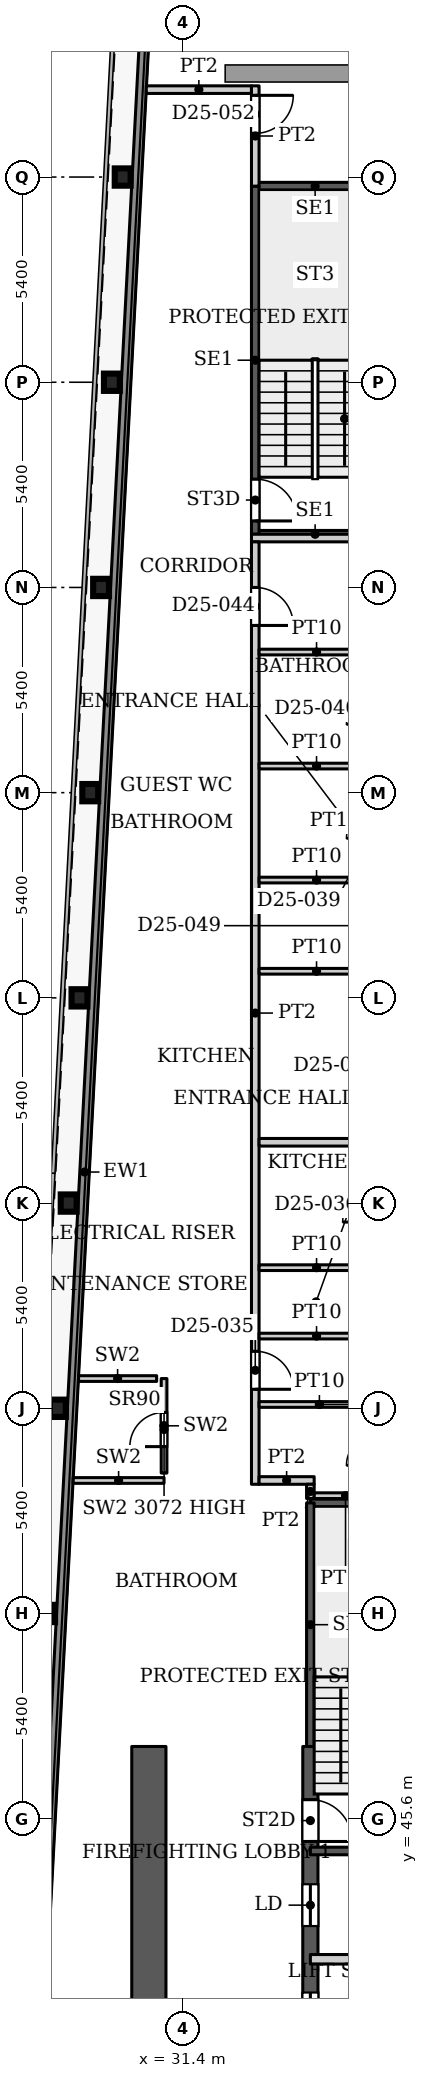
"""IFC4 building model, lengths in metres.
Left out: names, types, materials, properties, quantities, classifications, styles, units other than length and angle.
Written with IfcOpenShell. Run it as: python <this file> out.ifc"""

import sys

from ifc_helpers import new_model, si_unit, direction, frame, frame_2d, origin, origin_2d, place, context, subcontext, project, spatial, rectangle, i_section, extrude, source, transform, mapped, element, fill, save


model = new_model("IFC4")
c1 = context("Model", 3, precision=1e-05, world=origin(), true_north=direction((0.0, 1.0)))
c2 = subcontext(c1, "Body", "Model", "MODEL_VIEW")
j1 = project(units=[si_unit("LENGTHUNIT", "METRE"), si_unit("PLANEANGLEUNIT", "RADIAN")], contexts=[c1])
p1 = place(None, origin())
s1 = spatial("IfcSite", under=j1, at=p1, CompositionType="ELEMENT")
p2 = place(p1, origin())
s2 = spatial("IfcBuilding", under=s1, at=p2, CompositionType="ELEMENT")
p3 = place(p2, frame((0.0, 0.0, 113.6)))
s3 = spatial("IfcBuildingStorey", under=s2, at=p3, CompositionType="ELEMENT", Elevation=113.6)
for number, where, z_axis, x_axis in (
    (1, (27.822, 51.0, 0.0), (0.0, 0.0, 1.0), (1.0, 0.0, 0.0)),
    (2, (28.106, 56.4, 0.0), (0.0, 0.0, 1.0), (1.0, 0.0, 0.0)),
    (3, (28.39, 61.8, 0.0), (0.0, 0.0, 1.0), (1.0, 0.0, 0.0)),
    (4, (28.674, 67.2, 0.0), (0.0, 0.0, 1.0), (1.0, 0.0, 0.0)),
    (5, (28.958, 72.6, 0.0), (0.0, 0.0, 1.0), (1.0, 0.0, 0.0)),
    (6, (29.243, 78.0, 0.0), (0.0, 0.0, 1.0), (1.0, 0.0, 0.0)),
    (7, (29.527, 83.4, 0.0), (0.0, 0.0, 1.0), (1.0, 0.0, 0.0)),
    (8, (29.811, 88.8, 0.0), (0.0, 0.0, 1.0), (1.0, 0.0, 0.0)),
):
    element("IfcColumn", number, at=place(p3, frame(where, z_axis=z_axis, x_axis=x_axis)), inside=s3, PredefinedType="COLUMN", context=c2, shape_type="SweptSolid", body=[
        extrude(i_section(OverallWidth=0.418, OverallDepth=0.455, WebThickness=0.042, FlangeThickness=0.068, FilletRadius=0.014, at=origin_2d()), origin(), (0.0, 0.0, 1.0), 3.9),
    ])
p4 = place(p3, frame((34.75, 29.05, 0.0), z_axis=(0.0, 0.0, 1.0), x_axis=(0.0, 1.0, 0.0)))
e9 = element("IfcWall", 9, at=p4, inside=s3, PredefinedType="SHEAR", context=c2, shape_type="SweptSolid", body=[
    extrude(rectangle(XDim=18.45, YDim=0.4, at=frame_2d((9.225, 0.0))), origin(), (0.0, 0.0, 1.0), 3.9),
])
p5 = place(p4, frame((8.025, 0.0, 0.0)))
e10 = element("IfcOpeningElement", 10, at=p5, cuts=e9, PredefinedType="OPENING", context=c2, shape_type="SweptSolid", body=[
    extrude(rectangle(XDim=1.1, YDim=2.2, at=frame_2d((0.55, 1.1))), frame((0.0, 0.21, 0.0), z_axis=(0.0, -1.0, 0.0), x_axis=(1.0, 0.0, 0.0)), (0.0, 0.0, 1.0), 0.42),
])
p6 = place(p4, frame((10.875, 0.0, 0.0)))
e11 = element("IfcOpeningElement", 11, at=p6, cuts=e9, PredefinedType="OPENING", context=c2, shape_type="SweptSolid", body=[
    extrude(rectangle(XDim=1.1, YDim=2.2, at=frame_2d((0.55, 1.1))), frame((0.0, 0.21, 0.0), z_axis=(0.0, -1.0, 0.0), x_axis=(1.0, 0.0, 0.0)), (0.0, 0.0, 1.0), 0.42),
])
p7 = place(p4, frame((13.725, 0.0, 0.0)))
e12 = element("IfcOpeningElement", 12, at=p7, cuts=e9, PredefinedType="OPENING", context=c2, shape_type="SweptSolid", body=[
    extrude(rectangle(XDim=1.1, YDim=2.2, at=frame_2d((0.55, 1.1))), frame((0.0, 0.21, 0.0), z_axis=(0.0, -1.0, 0.0), x_axis=(1.0, 0.0, 0.0)), (0.0, 0.0, 1.0), 0.42),
])
p8 = place(p4, frame((15.95, 0.0, 0.0)))
e13 = element("IfcOpeningElement", 13, at=p8, cuts=e9, PredefinedType="OPENING", context=c2, shape_type="SweptSolid", body=[
    extrude(rectangle(XDim=1.1, YDim=2.2, at=frame_2d((0.55, 1.1))), frame((0.0, 0.21, 0.0), z_axis=(0.0, -1.0, 0.0), x_axis=(1.0, 0.0, 0.0)), (0.0, 0.0, 1.0), 0.42),
])
p9 = place(p3, frame((30.5, 29.05, 0.0), z_axis=(0.0, 0.0, 1.0), x_axis=(0.0, 1.0, 0.0)))
e14 = element("IfcWall", 14, at=p9, inside=s3, PredefinedType="SHEAR", context=c2, shape_type="SweptSolid", body=[
    extrude(rectangle(XDim=18.45, YDim=0.9, at=frame_2d((9.225, 0.0))), origin(), (0.0, 0.0, 1.0), 3.9),
])
p10 = place(p9, frame((1.147, 0.0, 0.0)))
e15 = element("IfcOpeningElement", 15, at=p10, cuts=e14, PredefinedType="OPENING", context=c2, shape_type="SweptSolid", body=[
    extrude(rectangle(XDim=0.9, YDim=2.2, at=frame_2d((0.45, 1.1))), frame((0.0, 0.46, 0.0), z_axis=(0.0, -1.0, 0.0), x_axis=(1.0, 0.0, 0.0)), (0.0, 0.0, 1.0), 0.92),
])
p11 = place(p9, frame((7.925, 0.0, 0.0)))
e16 = element("IfcOpeningElement", 16, at=p11, cuts=e14, PredefinedType="OPENING", context=c2, shape_type="SweptSolid", body=[
    extrude(rectangle(XDim=0.9, YDim=2.2, at=frame_2d((0.45, 1.1))), frame((0.0, 0.46, 0.0), z_axis=(0.0, -1.0, 0.0), x_axis=(1.0, 0.0, 0.0)), (0.0, 0.0, 1.0), 0.92),
])
p12 = place(p3, frame((27.195, 31.969, 0.0), z_axis=(0.0, 0.0, 1.0), x_axis=(0.052555284099, 0.998618016117, 0.0)))
e17 = element("IfcWall", 17, at=p12, inside=s3, PredefinedType="SOLIDWALL", context=c2, shape_type="SweptSolid", body=[
    extrude(rectangle(XDim=61.38, YDim=0.25, at=frame_2d((30.69, 0.0))), origin(), (0.0, 0.0, 1.0), 3.75),
])
for number, where, z_axis, x_axis in (
    (18, (34.75, 44.75, 0.0), (0.0, 0.0, 1.0), (1.0, 0.0, 0.0)),
    (19, (34.75, 53.91, 0.0), (0.0, 0.0, 1.0), (1.0, 0.0, 0.0)),
):
    element("IfcWall", number, at=place(p3, frame(where, z_axis=z_axis, x_axis=x_axis)), inside=s3, PredefinedType="SHEAR", context=c2, shape_type="SweptSolid", body=[
        extrude(rectangle(XDim=3.15, YDim=0.2, at=frame_2d((1.575, 0.0))), origin(), (0.0, 0.0, 1.0), 3.9),
    ])
p13 = place(p3, frame((34.75, 47.5, 0.0), z_axis=(0.0, 0.0, 1.0), x_axis=(0.0, 1.0, 0.0)))
e20 = element("IfcWall", 20, at=p13, inside=s3, PredefinedType="SHEAR", context=c2, shape_type="SweptSolid", body=[
    extrude(rectangle(XDim=6.41, YDim=0.2, at=frame_2d((3.205, 0.0))), origin(), (0.0, 0.0, 1.0), 3.9),
])
for number, where, z_axis, x_axis in (
    (21, (33.3, 79.4, 0.0), (0.0, 0.0, 1.0), (1.0, 0.0, 0.0)),
    (22, (33.3, 88.56, 0.0), (0.0, 0.0, 1.0), (1.0, 0.0, 0.0)),
):
    element("IfcWall", number, at=place(p3, frame(where, z_axis=z_axis, x_axis=x_axis)), inside=s3, PredefinedType="SHEAR", context=c2, shape_type="SweptSolid", body=[
        extrude(rectangle(XDim=3.15, YDim=0.2, at=frame_2d((1.575, 0.0))), origin(), (0.0, 0.0, 1.0), 3.9),
    ])
p14 = place(p3, frame((33.3, 79.4, 0.0), z_axis=(0.0, 0.0, 1.0), x_axis=(0.0, 1.0, 0.0)))
e23 = element("IfcWall", 23, at=p14, inside=s3, PredefinedType="SHEAR", context=c2, shape_type="SweptSolid", body=[
    extrude(rectangle(XDim=9.16, YDim=0.2, at=frame_2d((4.58, 0.0))), origin(), (0.0, 0.0, 1.0), 3.9),
])
p15 = place(p14, frame((0.35, 0.0, 0.0)))
e24 = element("IfcOpeningElement", 24, at=p15, cuts=e23, PredefinedType="OPENING", context=c2, shape_type="SweptSolid", body=[
    extrude(rectangle(XDim=1.1, YDim=2.2, at=frame_2d((0.55, 1.1))), frame((0.0, 0.11, 0.0), z_axis=(0.0, -1.0, 0.0), x_axis=(1.0, 0.0, 0.0)), (0.0, 0.0, 1.0), 0.22),
])
p16 = place(p3, frame((34.75, 41.9, 0.0), z_axis=(0.0, 0.0, 1.0), x_axis=(1.0, 0.0, 0.0)))
e25 = element("IfcWall", 25, at=p16, inside=s3, PredefinedType="PARTITIONING", context=c2, shape_type="SweptSolid", body=[
    extrude(rectangle(XDim=3.25, YDim=0.25, at=frame_2d((1.625, 0.0))), origin(), (0.0, 0.0, 1.0), 3.9),
])
p17 = place(p3, frame((28.508, 54.5, 0.0), z_axis=(0.0, 0.0, 1.0), x_axis=(1.0, 0.0, 0.0)))
e26 = element("IfcWall", 26, at=p17, inside=s3, PredefinedType="PARTITIONING", context=c2, shape_type="SweptSolid", body=[
    extrude(rectangle(XDim=2.392, YDim=0.15, at=frame_2d((1.196, 0.0))), origin(), (0.0, 0.0, 1.0), 3.9),
])
p18 = place(p3, frame((30.9, 54.695, 0.0), z_axis=(0.0, 0.0, 1.0), x_axis=(0.0, 1.0, 0.0)))
e27 = element("IfcWall", 27, at=p18, inside=s3, PredefinedType="PARTITIONING", context=c2, shape_type="SweptSolid", body=[
    extrude(rectangle(XDim=2.487, YDim=0.15, at=frame_2d((1.243, 0.0))), origin(), (0.0, 0.0, 1.0), 3.072),
])
p19 = place(p18, frame((0.696, 0.0, 0.0)))
e28 = element("IfcOpeningElement", 28, at=p19, cuts=e27, PredefinedType="OPENING", context=c2, shape_type="SweptSolid", body=[
    extrude(rectangle(XDim=0.9, YDim=2.2, at=frame_2d((0.45, 1.1))), frame((0.0, 0.085, 0.0), z_axis=(0.0, -1.0, 0.0), x_axis=(1.0, 0.0, 0.0)), (0.0, 0.0, 1.0), 0.17),
])
p20 = place(p3, frame((28.65, 57.182, 0.0), z_axis=(0.0, 0.0, 1.0), x_axis=(1.0, 0.0, 0.0)))
e29 = element("IfcWall", 29, at=p20, inside=s3, PredefinedType="PARTITIONING", context=c2, shape_type="SweptSolid", body=[
    extrude(rectangle(XDim=2.055, YDim=0.15, at=frame_2d((1.028, 0.0))), origin(), (0.0, 0.0, 1.0), 3.9),
])
p21 = place(p3, frame((30.432, 91.1, 0.0), z_axis=(0.0, 0.0, 1.0), x_axis=(1.0, 0.0, 0.0)))
e30 = element("IfcWall", 30, at=p21, inside=s3, PredefinedType="PARTITIONING", context=c2, shape_type="SweptSolid", body=[
    extrude(rectangle(XDim=2.768, YDim=0.2, at=frame_2d((1.384, 0.0))), origin(), (0.0, 0.0, 1.0), 3.6),
])
p22 = place(p3, frame((33.2, 79.3, 0.0), z_axis=(0.0, 0.0, 1.0), x_axis=(1.0, 0.0, 0.0)))
e31 = element("IfcWall", 31, at=p22, inside=s3, PredefinedType="PARTITIONING", context=c2, shape_type="SweptSolid", body=[
    extrude(rectangle(XDim=12.7, YDim=0.2, at=frame_2d((6.35, 0.0))), origin(), (0.0, 0.0, 1.0), 3.6),
])
p23 = place(p3, frame((33.3, 54.4, 0.0), z_axis=(0.0, 0.0, 1.0), x_axis=(0.0, 1.0, 0.0)))
e32 = element("IfcWall", 32, at=p23, inside=s3, PredefinedType="PARTITIONING", context=c2, shape_type="SweptSolid", body=[
    extrude(rectangle(XDim=24.8, YDim=0.2, at=frame_2d((12.4, 0.0))), origin(), (0.0, 0.0, 1.0), 3.6),
])
p24 = place(p23, frame((2.5, 0.0, 0.0)))
e33 = element("IfcOpeningElement", 33, at=p24, cuts=e32, PredefinedType="OPENING", context=c2, shape_type="SweptSolid", body=[
    extrude(rectangle(XDim=1.0, YDim=2.1, at=frame_2d((0.5, 1.05))), frame((0.0, 0.11, 0.0), z_axis=(0.0, -1.0, 0.0), x_axis=(1.0, 0.0, 0.0)), (0.0, 0.0, 1.0), 0.22),
])
p25 = place(p23, frame((22.6, 0.0, 0.0)))
e34 = element("IfcOpeningElement", 34, at=p25, cuts=e32, PredefinedType="OPENING", context=c2, shape_type="SweptSolid", body=[
    extrude(rectangle(XDim=1.0, YDim=2.1, at=frame_2d((0.5, 1.05))), frame((0.0, 0.11, 0.0), z_axis=(0.0, -1.0, 0.0), x_axis=(1.0, 0.0, 0.0)), (0.0, 0.0, 1.0), 0.22),
])
p26 = place(p3, frame((33.3, 88.56, 0.0), z_axis=(0.0, 0.0, 1.0), x_axis=(0.0, 1.0, 0.0)))
e35 = element("IfcWall", 35, at=p26, inside=s3, PredefinedType="PARTITIONING", context=c2, shape_type="SweptSolid", body=[
    extrude(rectangle(XDim=2.64, YDim=0.2, at=frame_2d((1.32, 0.0))), origin(), (0.0, 0.0, 1.0), 3.6),
])
p27 = place(p26, frame((1.39, 0.0, 0.0)))
e36 = element("IfcOpeningElement", 36, at=p27, cuts=e35, PredefinedType="OPENING", context=c2, shape_type="SweptSolid", body=[
    extrude(rectangle(XDim=1.0, YDim=2.1, at=frame_2d((0.5, 1.05))), frame((0.0, 0.11, 0.0), z_axis=(0.0, -1.0, 0.0), x_axis=(1.0, 0.0, 0.0)), (0.0, 0.0, 1.0), 0.22),
])
p28 = place(p3, frame((33.4, 54.5, 0.0), z_axis=(0.0, 0.0, 1.0), x_axis=(1.0, 0.0, 0.0)))
e37 = element("IfcWall", 37, at=p28, inside=s3, PredefinedType="PARTITIONING", context=c2, shape_type="SweptSolid", body=[
    extrude(rectangle(XDim=1.45, YDim=0.2, at=frame_2d((0.725, 0.0))), origin(), (0.0, 0.0, 1.0), 3.6),
])
p29 = place(p3, frame((33.4, 56.5, 0.0), z_axis=(0.0, 0.0, 1.0), x_axis=(1.0, 0.0, 0.0)))
e38 = element("IfcWall", 38, at=p29, inside=s3, PredefinedType="PARTITIONING", context=c2, shape_type="SweptSolid", body=[
    extrude(rectangle(XDim=3.175, YDim=0.15, at=frame_2d((1.587, 0.0))), origin(), (0.0, 0.0, 1.0), 3.072),
])
for number, where, z_axis, x_axis in (
    (39, (33.4, 58.3, 0.0), (0.0, 0.0, 1.0), (1.0, 0.0, 0.0)),
    (40, (33.4, 60.1, 0.0), (0.0, 0.0, 1.0), (1.0, 0.0, 0.0)),
):
    element("IfcWall", number, at=place(p3, frame(where, z_axis=z_axis, x_axis=x_axis)), inside=s3, PredefinedType="PARTITIONING", context=c2, shape_type="SweptSolid", body=[
        extrude(rectangle(XDim=3.025, YDim=0.15, at=frame_2d((1.513, 0.0))), origin(), (0.0, 0.0, 1.0), 3.6),
    ])
p30 = place(p3, frame((33.4, 63.4, 0.0), z_axis=(0.0, 0.0, 1.0), x_axis=(1.0, 0.0, 0.0)))
e41 = element("IfcWall", 41, at=p30, inside=s3, PredefinedType="PARTITIONING", context=c2, shape_type="SweptSolid", body=[
    extrude(rectangle(XDim=12.5, YDim=0.2, at=frame_2d((6.25, 0.0))), origin(), (0.0, 0.0, 1.0), 3.6),
])
for number, where, z_axis, x_axis in (
    (42, (33.4, 67.9, 0.0), (0.0, 0.0, 1.0), (1.0, 0.0, 0.0)),
    (43, (33.4, 70.3, 0.0), (0.0, 0.0, 1.0), (1.0, 0.0, 0.0)),
    (44, (33.4, 73.3, 0.0), (0.0, 0.0, 1.0), (1.0, 0.0, 0.0)),
    (45, (33.4, 76.3, 0.0), (0.0, 0.0, 1.0), (1.0, 0.0, 0.0)),
):
    element("IfcWall", number, at=place(p3, frame(where, z_axis=z_axis, x_axis=x_axis)), inside=s3, PredefinedType="PARTITIONING", context=c2, shape_type="SweptSolid", body=[
        extrude(rectangle(XDim=3.025, YDim=0.15, at=frame_2d((1.513, 0.0))), origin(), (0.0, 0.0, 1.0), 3.6),
    ])
p31 = place(p3, frame((34.75, 54.025, 0.0), z_axis=(0.0, 0.0, 1.0), x_axis=(0.0, 1.0, 0.0)))
e46 = element("IfcWall", 46, at=p31, inside=s3, PredefinedType="PARTITIONING", context=c2, shape_type="SweptSolid", body=[
    extrude(rectangle(XDim=0.375, YDim=0.2, at=frame_2d((0.188, 0.0))), origin(), (0.0, 0.0, 1.0), 3.6),
])
p32 = place(p3, frame((34.85, 54.1, 0.0), z_axis=(0.0, 0.0, 1.0), x_axis=(1.0, 0.0, 0.0)))
e47 = element("IfcWall", 47, at=p32, inside=s3, PredefinedType="PARTITIONING", context=c2, shape_type="SweptSolid", body=[
    extrude(rectangle(XDim=1.65, YDim=0.15, at=frame_2d((0.825, 0.0))), origin(), (0.0, 0.0, 1.0), 3.6),
])
m1 = source(origin(), c2, "Body", "SweptSolid", [
    extrude(rectangle(XDim=1.1, YDim=2.2, at=frame_2d((0.55, 1.1))), frame((0.0, 0.025, 0.0), z_axis=(0.0, -1.0, 0.0), x_axis=(1.0, 0.0, 0.0)), (0.0, 0.0, 1.0), 0.05),
])
p33 = place(p6, origin())
e48 = element("IfcDoor", 48, at=p33, inside=s3, OperationType="SLIDING_TO_LEFT", PredefinedType="DOOR", context=c2, shape_type="MappedRepresentation", body=[
    mapped(m1, transform((0.0, 0.0, 0.0), x_axis=(1.0, 0.0, 0.0), y_axis=(0.0, 1.0, 0.0), z_axis=(0.0, 0.0, 1.0), scale=1.0)),
])
fill(e11, e48)
p34 = place(p7, origin())
e49 = element("IfcDoor", 49, at=p34, inside=s3, OperationType="SLIDING_TO_LEFT", PredefinedType="DOOR", context=c2, shape_type="MappedRepresentation", body=[
    mapped(m1, transform((0.0, 0.0, 0.0), x_axis=(1.0, 0.0, 0.0), y_axis=(0.0, 1.0, 0.0), z_axis=(0.0, 0.0, 1.0), scale=1.0)),
])
fill(e12, e49)
m2 = source(origin(), c2, "Body", "SweptSolid", [
    extrude(rectangle(XDim=0.9, YDim=2.2, at=frame_2d((0.45, 1.1))), frame((0.0, 0.025, 0.0), z_axis=(0.0, -1.0, 0.0), x_axis=(1.0, 0.0, 0.0)), (0.0, 0.0, 1.0), 0.05),
])
p35 = place(p19, origin())
e50 = element("IfcDoor", 50, at=p35, inside=s3, OperationType="SINGLE_SWING_LEFT", PredefinedType="DOOR", context=c2, shape_type="MappedRepresentation", body=[
    mapped(m2, transform((0.0, 0.0, 0.0), x_axis=(1.0, 0.0, 0.0), y_axis=(0.0, 1.0, 0.0), z_axis=(0.0, 0.0, 1.0), scale=1.0)),
])
fill(e28, e50)
m3 = source(origin(), c2, "Body", "SweptSolid", [
    extrude(rectangle(XDim=1.1, YDim=2.2, at=frame_2d((0.55, 1.1))), frame((0.0, 0.025, 0.0), z_axis=(0.0, -1.0, 0.0), x_axis=(1.0, 0.0, 0.0)), (0.0, 0.0, 1.0), 0.05),
])
p36 = place(p8, origin())
e51 = element("IfcDoor", 51, at=p36, inside=s3, OperationType="SINGLE_SWING_RIGHT", PredefinedType="DOOR", context=c2, shape_type="MappedRepresentation", body=[
    mapped(m3, transform((0.0, 0.0, 0.0), x_axis=(1.0, 0.0, 0.0), y_axis=(0.0, 1.0, 0.0), z_axis=(0.0, 0.0, 1.0), scale=1.0)),
])
fill(e13, e51)
p37 = place(p15, origin())
e52 = element("IfcDoor", 52, at=p37, inside=s3, OperationType="SINGLE_SWING_RIGHT", PredefinedType="DOOR", context=c2, shape_type="MappedRepresentation", body=[
    mapped(m3, transform((0.0, 0.0, 0.0), x_axis=(1.0, 0.0, 0.0), y_axis=(0.0, 1.0, 0.0), z_axis=(0.0, 0.0, 1.0), scale=1.0)),
])
fill(e24, e52)
m4 = source(origin(), c2, "Body", "SweptSolid", [
    extrude(rectangle(XDim=1.0, YDim=2.1, at=frame_2d((0.5, 1.05))), frame((0.0, 0.025, 0.0), z_axis=(0.0, -1.0, 0.0), x_axis=(1.0, 0.0, 0.0)), (0.0, 0.0, 1.0), 0.05),
])
p38 = place(p24, origin())
e53 = element("IfcDoor", 53, at=p38, inside=s3, OperationType="SINGLE_SWING_RIGHT", PredefinedType="DOOR", context=c2, shape_type="MappedRepresentation", body=[
    mapped(m4, transform((0.0, 0.0, 0.0), x_axis=(1.0, 0.0, 0.0), y_axis=(0.0, 1.0, 0.0), z_axis=(0.0, 0.0, 1.0), scale=1.0)),
])
fill(e33, e53)
p39 = place(p25, origin())
e54 = element("IfcDoor", 54, at=p39, inside=s3, OperationType="SINGLE_SWING_RIGHT", PredefinedType="DOOR", context=c2, shape_type="MappedRepresentation", body=[
    mapped(m4, transform((0.0, 0.0, 0.0), x_axis=(1.0, 0.0, 0.0), y_axis=(0.0, 1.0, 0.0), z_axis=(0.0, 0.0, 1.0), scale=1.0)),
])
fill(e34, e54)
m5 = source(origin(), c2, "Body", "SweptSolid", [
    extrude(rectangle(XDim=1.0, YDim=2.1, at=frame_2d((0.5, 1.05))), frame((0.0, 0.025, 0.0), z_axis=(0.0, -1.0, 0.0), x_axis=(1.0, 0.0, 0.0)), (0.0, 0.0, 1.0), 0.05),
])
p40 = place(p27, origin())
e55 = element("IfcDoor", 55, at=p40, inside=s3, OperationType="SINGLE_SWING_RIGHT", PredefinedType="DOOR", context=c2, shape_type="MappedRepresentation", body=[
    mapped(m5, transform((0.0, 0.0, 0.0), x_axis=(1.0, 0.0, 0.0), y_axis=(0.0, 1.0, 0.0), z_axis=(0.0, 0.0, 1.0), scale=1.0)),
])
fill(e36, e55)
save(model, sys.argv[1])
